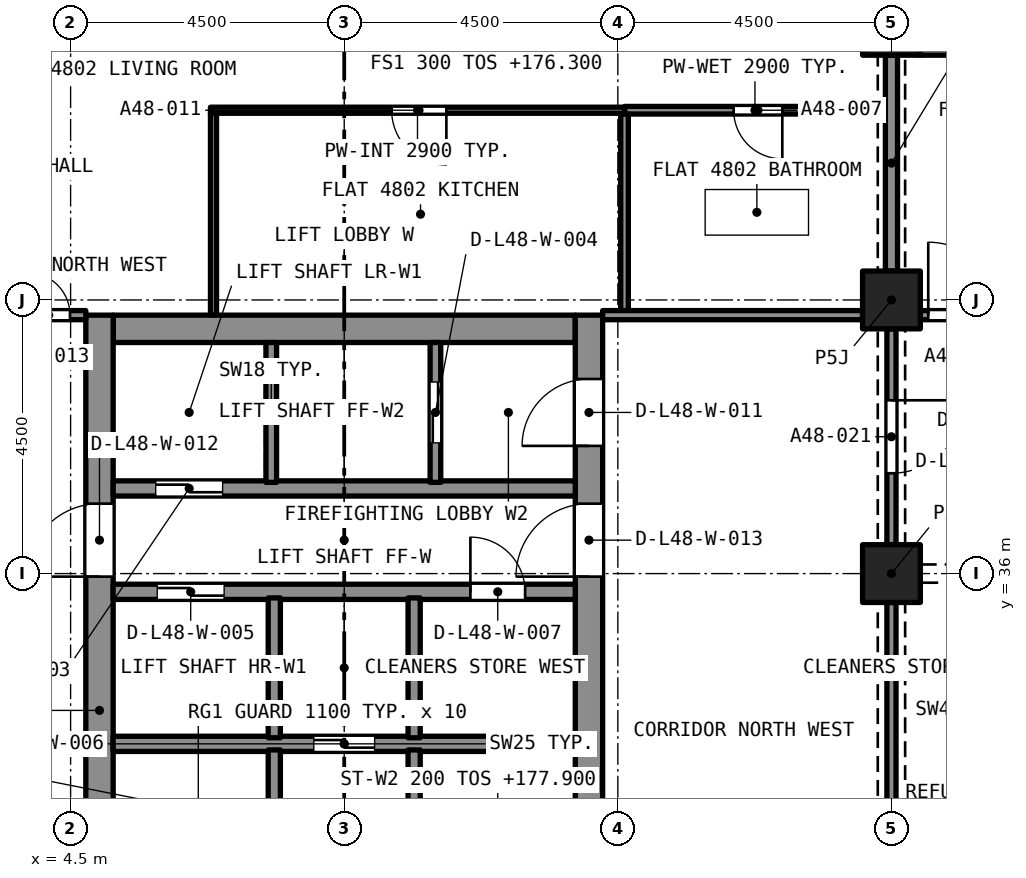
"""IFC4 building model, lengths in metres.
Left out: names, types, materials, properties, quantities, classifications, styles, units other than length and angle.
Written with IfcOpenShell. Run it as: python <this file> out.ifc"""

import sys

from ifc_helpers import new_model, si_unit, direction, frame, frame_2d, origin, origin_2d, place, context, subcontext, project, spatial, rectangle, extrude, element, fill, save


model = new_model("IFC4")
c1 = context("Model", 3, precision=1e-05, world=origin(), true_north=direction((0.0, 1.0)))
c2 = subcontext(c1, "Body", "Model", "MODEL_VIEW")
j1 = project(units=[si_unit("LENGTHUNIT", "METRE"), si_unit("PLANEANGLEUNIT", "RADIAN")], contexts=[c1])
p1 = place(None, origin())
s1 = spatial("IfcSite", under=j1, at=p1, CompositionType="ELEMENT")
p2 = place(p1, origin())
s2 = spatial("IfcBuilding", under=s1, at=p2, CompositionType="ELEMENT")
p3 = place(p2, frame((0.0, 0.0, 176.3)))
s3 = spatial("IfcBuildingStorey", under=s2, at=p3, CompositionType="ELEMENT", Elevation=176.3)
for number, where, z_axis, x_axis in (
    (1, (18.0, 36.0, 0.0), (0.0, 0.0, 1.0), (1.0, 0.0, 0.0)),
    (2, (18.0, 40.5, 0.0), (0.0, 0.0, 1.0), (1.0, 0.0, 0.0)),
    (3, (18.0, 45.0, 0.0), (0.0, 0.0, 1.0), (1.0, 0.0, 0.0)),
):
    element("IfcColumn", number, at=place(p3, frame(where, z_axis=z_axis, x_axis=x_axis)), inside=s3, PredefinedType="COLUMN", context=c2, shape_type="SweptSolid", body=[
        extrude(rectangle(XDim=0.95, YDim=0.95, at=origin_2d()), origin(), (0.0, 0.0, 1.0), 3.2),
    ])
p4 = place(p3, frame((5.2, 40.025, 0.0), z_axis=(0.0, 0.0, 1.0), x_axis=(1.0, 0.0, 0.0)))
e4 = element("IfcWall", 4, at=p4, inside=s3, PredefinedType="SOLIDWALL", context=c2, shape_type="SweptSolid", body=[
    extrude(rectangle(XDim=7.6, YDim=0.45, at=frame_2d((3.8, 0.0))), origin(), (0.0, 0.0, 1.0), 3.2),
])
p5 = place(p3, frame((4.975, 27.25, 0.0), z_axis=(0.0, 0.0, 1.0), x_axis=(0.0, 1.0, 0.0)))
e5 = element("IfcWall", 5, at=p5, inside=s3, PredefinedType="SOLIDWALL", context=c2, shape_type="SweptSolid", body=[
    extrude(rectangle(XDim=13.0, YDim=0.45, at=frame_2d((6.5, 0.0))), origin(), (0.0, 0.0, 1.0), 3.2),
])
p6 = place(p5, frame((8.7, 0.0, 0.0)))
e6 = element("IfcOpeningElement", 6, at=p6, cuts=e5, PredefinedType="OPENING", context=c2, shape_type="SweptSolid", body=[
    extrude(rectangle(XDim=1.2, YDim=2.1, at=frame_2d((0.6, 1.05))), frame((0.0, 0.235, 0.0), z_axis=(0.0, -1.0, 0.0), x_axis=(1.0, 0.0, 0.0)), (0.0, 0.0, 1.0), 0.47),
])
p7 = place(p3, frame((13.025, 27.25, 0.0), z_axis=(0.0, 0.0, 1.0), x_axis=(0.0, 1.0, 0.0)))
e7 = element("IfcWall", 7, at=p7, inside=s3, PredefinedType="SOLIDWALL", context=c2, shape_type="SweptSolid", body=[
    extrude(rectangle(XDim=13.0, YDim=0.45, at=frame_2d((6.5, 0.0))), origin(), (0.0, 0.0, 1.0), 3.2),
])
p8 = place(p7, frame((10.85, 0.0, 0.0)))
e8 = element("IfcOpeningElement", 8, at=p8, cuts=e7, PredefinedType="OPENING", context=c2, shape_type="SweptSolid", body=[
    extrude(rectangle(XDim=1.1, YDim=2.1, at=frame_2d((0.55, 1.05))), frame((0.0, 0.235, 0.0), z_axis=(0.0, -1.0, 0.0), x_axis=(1.0, 0.0, 0.0)), (0.0, 0.0, 1.0), 0.47),
])
p9 = place(p7, frame((8.7, 0.0, 0.0)))
e9 = element("IfcOpeningElement", 9, at=p9, cuts=e7, PredefinedType="OPENING", context=c2, shape_type="SweptSolid", body=[
    extrude(rectangle(XDim=1.2, YDim=2.1, at=frame_2d((0.6, 1.05))), frame((0.0, 0.235, 0.0), z_axis=(0.0, -1.0, 0.0), x_axis=(1.0, 0.0, 0.0)), (0.0, 0.0, 1.0), 0.47),
])
p10 = place(p3, frame((17.9, 43.62, 0.0), z_axis=(0.0, 0.0, 1.0), x_axis=(-1.0, 0.0, 0.0)))
e10 = element("IfcWall", 10, at=p10, inside=s3, PredefinedType="PARTITIONING", context=c2, shape_type="SweptSolid", body=[
    extrude(rectangle(XDim=4.29, YDim=0.125, at=frame_2d((2.145, 0.0))), origin(), (0.0, 0.0, 1.0), 2.9),
])
p11 = place(p10, frame((1.695, 0.0, 0.0)))
e11 = element("IfcOpeningElement", 11, at=p11, cuts=e10, PredefinedType="OPENING", context=c2, shape_type="SweptSolid", body=[
    extrude(rectangle(XDim=0.8, YDim=2.1, at=frame_2d((0.4, 1.05))), frame((0.0, 0.073, 0.0), z_axis=(0.0, -1.0, 0.0), x_axis=(1.0, 0.0, 0.0)), (0.0, 0.0, 1.0), 0.145),
])
p12 = place(p3, frame((13.61, 40.325, 0.0), z_axis=(0.0, 0.0, 1.0), x_axis=(0.0, 1.0, 0.0)))
e12 = element("IfcWall", 12, at=p12, inside=s3, PredefinedType="PARTITIONING", context=c2, shape_type="SweptSolid", body=[
    extrude(rectangle(XDim=3.233, YDim=0.125, at=frame_2d((1.616, 0.0))), origin(), (0.0, 0.0, 1.0), 2.9),
])
p13 = place(p3, frame((18.0, 40.975, 0.0), z_axis=(0.0, 0.0, 1.0), x_axis=(0.0, 1.0, 0.0)))
e13 = element("IfcWall", 13, at=p13, inside=s3, PredefinedType="PARTITIONING", context=c2, shape_type="SweptSolid", body=[
    extrude(rectangle(XDim=3.55, YDim=0.2, at=frame_2d((1.775, 0.0))), origin(), (0.0, 0.0, 1.0), 2.38),
])
p14 = place(p3, frame((13.61, 43.62, 0.0), z_axis=(0.0, 0.0, 1.0), x_axis=(-1.0, 0.0, 0.0)))
e14 = element("IfcWall", 14, at=p14, inside=s3, PredefinedType="PARTITIONING", context=c2, shape_type="SweptSolid", body=[
    extrude(rectangle(XDim=6.81, YDim=0.1, at=frame_2d((3.405, 0.0))), origin(), (0.0, 0.0, 1.0), 2.9),
])
p15 = place(p14, frame((2.93, 0.0, 0.0)))
e15 = element("IfcOpeningElement", 15, at=p15, cuts=e14, PredefinedType="OPENING", context=c2, shape_type="SweptSolid", body=[
    extrude(rectangle(XDim=0.9, YDim=2.1, at=frame_2d((0.45, 1.05))), frame((0.0, 0.06, 0.0), z_axis=(0.0, -1.0, 0.0), x_axis=(1.0, 0.0, 0.0)), (0.0, 0.0, 1.0), 0.12),
])
p16 = place(p3, frame((6.85, 40.25, 0.0), z_axis=(0.0, 0.0, 1.0), x_axis=(0.0, 1.0, 0.0)))
e16 = element("IfcWall", 16, at=p16, inside=s3, PredefinedType="PARTITIONING", context=c2, shape_type="SweptSolid", body=[
    extrude(rectangle(XDim=3.32, YDim=0.1, at=frame_2d((1.66, 0.0))), origin(), (0.0, 0.0, 1.0), 2.9),
])
p17 = place(p3, frame((3.55, 40.25, 0.0), z_axis=(0.0, 0.0, 1.0), x_axis=(1.0, 0.0, 0.0)))
e17 = element("IfcWall", 17, at=p17, inside=s3, PredefinedType="PARTITIONING", context=c2, shape_type="SweptSolid", body=[
    extrude(rectangle(XDim=1.2, YDim=0.15, at=frame_2d((0.6, 0.0))), origin(), (0.0, 0.0, 1.0), 2.9),
])
p18 = place(p17, frame((0.24, 0.0, 0.0)))
e18 = element("IfcOpeningElement", 18, at=p18, cuts=e17, PredefinedType="OPENING", context=c2, shape_type="SweptSolid", body=[
    extrude(rectangle(XDim=0.7, YDim=2.1, at=frame_2d((0.35, 1.05))), frame((0.0, 0.085, 0.0), z_axis=(0.0, -1.0, 0.0), x_axis=(1.0, 0.0, 0.0)), (0.0, 0.0, 1.0), 0.17),
])
p19 = place(p3, frame((13.25, 40.25, 0.0), z_axis=(0.0, 0.0, 1.0), x_axis=(1.0, 0.0, 0.0)))
e19 = element("IfcWall", 19, at=p19, inside=s3, PredefinedType="PARTITIONING", context=c2, shape_type="SweptSolid", body=[
    extrude(rectangle(XDim=4.275, YDim=0.15, at=frame_2d((2.137, 0.0))), origin(), (0.0, 0.0, 1.0), 2.9),
])
p20 = place(p3, frame((18.475, 44.575, 0.0), z_axis=(0.0, 0.0, 1.0), x_axis=(1.0, 0.0, 0.0)))
e20 = element("IfcWall", 20, at=p20, inside=s3, PredefinedType="PARTITIONING", context=c2, shape_type="SweptSolid", body=[
    extrude(rectangle(XDim=4.025, YDim=0.1, at=frame_2d((2.012, 0.0))), origin(), (0.0, 0.0, 1.0), 2.75),
])
p21 = place(p20, frame((1.325, 0.0, 0.0)))
e21 = element("IfcOpeningElement", 21, at=p21, cuts=e20, PredefinedType="OPENING", context=c2, shape_type="SweptSolid", body=[
    extrude(rectangle(XDim=0.9, YDim=2.1, at=frame_2d((0.45, 1.05))), frame((0.0, 0.06, 0.0), z_axis=(0.0, -1.0, 0.0), x_axis=(1.0, 0.0, 0.0)), (0.0, 0.0, 1.0), 0.12),
])
p22 = place(p3, frame((18.475, 40.25, 0.0), z_axis=(0.0, 0.0, 1.0), x_axis=(1.0, 0.0, 0.0)))
e22 = element("IfcWall", 22, at=p22, inside=s3, PredefinedType="PARTITIONING", context=c2, shape_type="SweptSolid", body=[
    extrude(rectangle(XDim=1.925, YDim=0.15, at=frame_2d((0.962, 0.0))), origin(), (0.0, 0.0, 1.0), 2.75),
])
p23 = place(p22, frame((0.13, 0.0, 0.0)))
e23 = element("IfcOpeningElement", 23, at=p23, cuts=e22, PredefinedType="OPENING", context=c2, shape_type="SweptSolid", body=[
    extrude(rectangle(XDim=1.2, YDim=2.4, at=frame_2d((0.6, 1.2))), frame((0.0, 0.085, 0.0), z_axis=(0.0, -1.0, 0.0), x_axis=(1.0, 0.0, 0.0)), (0.0, 0.0, 1.0), 0.17),
])
p24 = place(p3, frame((18.0, 31.975, 0.0), z_axis=(0.0, 0.0, 1.0), x_axis=(0.0, 1.0, 0.0)))
e24 = element("IfcWall", 24, at=p24, inside=s3, PredefinedType="PARTITIONING", context=c2, shape_type="SweptSolid", body=[
    extrude(rectangle(XDim=3.55, YDim=0.15, at=frame_2d((1.775, 0.0))), origin(), (0.0, 0.0, 1.0), 2.38),
])
p25 = place(p3, frame((18.0, 40.025, 0.0), z_axis=(0.0, 0.0, 1.0), x_axis=(0.0, -1.0, 0.0)))
e25 = element("IfcWall", 25, at=p25, inside=s3, PredefinedType="PARTITIONING", context=c2, shape_type="SweptSolid", body=[
    extrude(rectangle(XDim=3.55, YDim=0.15, at=frame_2d((1.775, 0.0))), origin(), (0.0, 0.0, 1.0), 2.38),
])
p26 = place(p25, frame((1.175, 0.0, 0.0)))
e26 = element("IfcOpeningElement", 26, at=p26, cuts=e25, PredefinedType="OPENING", context=c2, shape_type="SweptSolid", body=[
    extrude(rectangle(XDim=1.2, YDim=2.1, at=frame_2d((0.6, 1.05))), frame((0.0, 0.085, 0.0), z_axis=(0.0, -1.0, 0.0), x_axis=(1.0, 0.0, 0.0)), (0.0, 0.0, 1.0), 0.17),
])
p27 = place(p3, frame((5.2, 33.2, 0.0), z_axis=(0.0, 0.0, 1.0), x_axis=(1.0, 0.0, 0.0)))
e27 = element("IfcWall", 27, at=p27, inside=s3, PredefinedType="SOLIDWALL", context=c2, shape_type="SweptSolid", body=[
    extrude(rectangle(XDim=7.6, YDim=0.25, at=frame_2d((3.8, 0.0))), origin(), (0.0, 0.0, 1.0), 2.9),
])
p28 = place(p27, frame((3.3, 0.0, 0.0)))
e28 = element("IfcOpeningElement", 28, at=p28, cuts=e27, PredefinedType="OPENING", context=c2, shape_type="SweptSolid", body=[
    extrude(rectangle(XDim=1.0, YDim=2.1, at=frame_2d((0.5, 1.05))), frame((0.0, 0.135, 0.0), z_axis=(0.0, -1.0, 0.0), x_axis=(1.0, 0.0, 0.0)), (0.0, 0.0, 1.0), 0.27),
])
p29 = place(p3, frame((5.2, 35.7, 0.0), z_axis=(0.0, 0.0, 1.0), x_axis=(1.0, 0.0, 0.0)))
e29 = element("IfcWall", 29, at=p29, inside=s3, PredefinedType="SOLIDWALL", context=c2, shape_type="SweptSolid", body=[
    extrude(rectangle(XDim=7.6, YDim=0.25, at=frame_2d((3.8, 0.0))), origin(), (0.0, 0.0, 1.0), 2.9),
])
p30 = place(p29, frame((0.725, 0.0, 0.0)))
e30 = element("IfcOpeningElement", 30, at=p30, cuts=e29, PredefinedType="OPENING", context=c2, shape_type="SweptSolid", body=[
    extrude(rectangle(XDim=1.1, YDim=2.4, at=frame_2d((0.55, 1.2))), frame((0.0, 0.135, 0.0), z_axis=(0.0, -1.0, 0.0), x_axis=(1.0, 0.0, 0.0)), (0.0, 0.0, 1.0), 0.27),
])
p31 = place(p29, frame((5.875, 0.0, 0.0)))
e31 = element("IfcOpeningElement", 31, at=p31, cuts=e29, PredefinedType="OPENING", context=c2, shape_type="SweptSolid", body=[
    extrude(rectangle(XDim=0.9, YDim=2.1, at=frame_2d((0.45, 1.05))), frame((0.0, 0.135, 0.0), z_axis=(0.0, -1.0, 0.0), x_axis=(1.0, 0.0, 0.0)), (0.0, 0.0, 1.0), 0.27),
])
p32 = place(p3, frame((5.2, 37.4, 0.0), z_axis=(0.0, 0.0, 1.0), x_axis=(1.0, 0.0, 0.0)))
e32 = element("IfcWall", 32, at=p32, inside=s3, PredefinedType="SOLIDWALL", context=c2, shape_type="SweptSolid", body=[
    extrude(rectangle(XDim=7.6, YDim=0.25, at=frame_2d((3.8, 0.0))), origin(), (0.0, 0.0, 1.0), 2.9),
])
p33 = place(p32, frame((0.7, 0.0, 0.0)))
e33 = element("IfcOpeningElement", 33, at=p33, cuts=e32, PredefinedType="OPENING", context=c2, shape_type="SweptSolid", body=[
    extrude(rectangle(XDim=1.1, YDim=2.4, at=frame_2d((0.55, 1.2))), frame((0.0, 0.135, 0.0), z_axis=(0.0, -1.0, 0.0), x_axis=(1.0, 0.0, 0.0)), (0.0, 0.0, 1.0), 0.27),
])
p34 = place(p3, frame((7.85, 27.7, 0.0), z_axis=(0.0, 0.0, 1.0), x_axis=(0.0, 1.0, 0.0)))
e34 = element("IfcWall", 34, at=p34, inside=s3, PredefinedType="SOLIDWALL", context=c2, shape_type="SweptSolid", body=[
    extrude(rectangle(XDim=5.4, YDim=0.2, at=frame_2d((2.7, 0.0))), origin(), (0.0, 0.0, 1.0), 2.9),
])
p35 = place(p34, frame((0.2, 0.0, 0.0)))
e35 = element("IfcOpeningElement", 35, at=p35, cuts=e34, PredefinedType="OPENING", context=c2, shape_type="SweptSolid", body=[
    extrude(rectangle(XDim=0.9, YDim=2.1, at=frame_2d((0.45, 1.05))), frame((0.0, 0.11, 0.0), z_axis=(0.0, -1.0, 0.0), x_axis=(1.0, 0.0, 0.0)), (0.0, 0.0, 1.0), 0.22),
])
p36 = place(p3, frame((10.15, 27.7, 0.0), z_axis=(0.0, 0.0, 1.0), x_axis=(0.0, 1.0, 0.0)))
e36 = element("IfcWall", 36, at=p36, inside=s3, PredefinedType="SOLIDWALL", context=c2, shape_type="SweptSolid", body=[
    extrude(rectangle(XDim=5.4, YDim=0.2, at=frame_2d((2.7, 0.0))), origin(), (0.0, 0.0, 1.0), 2.9),
])
p37 = place(p36, frame((0.2, 0.0, 0.0)))
e37 = element("IfcOpeningElement", 37, at=p37, cuts=e36, PredefinedType="OPENING", context=c2, shape_type="SweptSolid", body=[
    extrude(rectangle(XDim=0.9, YDim=2.1, at=frame_2d((0.45, 1.05))), frame((0.0, 0.11, 0.0), z_axis=(0.0, -1.0, 0.0), x_axis=(1.0, 0.0, 0.0)), (0.0, 0.0, 1.0), 0.22),
])
for number, where, z_axis, x_axis in (
    (38, (7.85, 33.3, 0.0), (0.0, 0.0, 1.0), (0.0, 1.0, 0.0)),
    (39, (10.15, 33.3, 0.0), (0.0, 0.0, 1.0), (0.0, 1.0, 0.0)),
):
    element("IfcWall", number, at=place(p3, frame(where, z_axis=z_axis, x_axis=x_axis)), inside=s3, PredefinedType="SOLIDWALL", context=c2, shape_type="SweptSolid", body=[
        extrude(rectangle(XDim=2.3, YDim=0.2, at=frame_2d((1.15, 0.0))), origin(), (0.0, 0.0, 1.0), 2.9),
    ])
p38 = place(p3, frame((7.8, 37.5, 0.0), z_axis=(0.0, 0.0, 1.0), x_axis=(0.0, 1.0, 0.0)))
e40 = element("IfcWall", 40, at=p38, inside=s3, PredefinedType="SOLIDWALL", context=c2, shape_type="SweptSolid", body=[
    extrude(rectangle(XDim=2.3, YDim=0.175, at=frame_2d((1.15, 0.0))), origin(), (0.0, 0.0, 1.0), 2.9),
])
p39 = place(p3, frame((10.5, 37.5, 0.0), z_axis=(0.0, 0.0, 1.0), x_axis=(0.0, 1.0, 0.0)))
e41 = element("IfcWall", 41, at=p39, inside=s3, PredefinedType="SOLIDWALL", context=c2, shape_type="SweptSolid", body=[
    extrude(rectangle(XDim=2.3, YDim=0.175, at=frame_2d((1.15, 0.0))), origin(), (0.0, 0.0, 1.0), 2.9),
])
p40 = place(p39, frame((0.65, 0.0, 0.0)))
e42 = element("IfcOpeningElement", 42, at=p40, cuts=e41, PredefinedType="OPENING", context=c2, shape_type="SweptSolid", body=[
    extrude(rectangle(XDim=1.0, YDim=2.1, at=frame_2d((0.5, 1.05))), frame((0.0, 0.097, 0.0), z_axis=(0.0, -1.0, 0.0), x_axis=(1.0, 0.0, 0.0)), (0.0, 0.0, 1.0), 0.195),
])
p41 = place(p11, origin())
e43 = element("IfcDoor", 43, at=p41, inside=s3, OperationType="SINGLE_SWING_LEFT", PredefinedType="DOOR", context=c2, shape_type="SweptSolid", body=[
    extrude(rectangle(XDim=0.8, YDim=2.1, at=frame_2d((0.4, 1.05))), frame((0.0, 0.025, 0.0), z_axis=(0.0, -1.0, 0.0), x_axis=(1.0, 0.0, 0.0)), (0.0, 0.0, 1.0), 0.05),
])
fill(e11, e43)
p42 = place(p15, origin())
e44 = element("IfcDoor", 44, at=p42, inside=s3, OperationType="SINGLE_SWING_LEFT", PredefinedType="DOOR", context=c2, shape_type="SweptSolid", body=[
    extrude(rectangle(XDim=0.9, YDim=2.1, at=frame_2d((0.45, 1.05))), frame((0.0, 0.025, 0.0), z_axis=(0.0, -1.0, 0.0), x_axis=(1.0, 0.0, 0.0)), (0.0, 0.0, 1.0), 0.05),
])
fill(e15, e44)
p43 = place(p18, origin())
e45 = element("IfcDoor", 45, at=p43, inside=s3, OperationType="SINGLE_SWING_LEFT", PredefinedType="DOOR", context=c2, shape_type="SweptSolid", body=[
    extrude(rectangle(XDim=0.7, YDim=2.1, at=frame_2d((0.35, 1.05))), frame((0.0, 0.025, 0.0), z_axis=(0.0, -1.0, 0.0), x_axis=(1.0, 0.0, 0.0)), (0.0, 0.0, 1.0), 0.05),
])
fill(e18, e45)
p44 = place(p23, origin())
e46 = element("IfcDoor", 46, at=p44, inside=s3, OperationType="SINGLE_SWING_LEFT", PredefinedType="DOOR", context=c2, shape_type="SweptSolid", body=[
    extrude(rectangle(XDim=1.2, YDim=2.4, at=frame_2d((0.6, 1.2))), frame((0.0, 0.025, 0.0), z_axis=(0.0, -1.0, 0.0), x_axis=(1.0, 0.0, 0.0)), (0.0, 0.0, 1.0), 0.05),
])
fill(e23, e46)
p45 = place(p26, origin())
e47 = element("IfcDoor", 47, at=p45, inside=s3, OperationType="SINGLE_SWING_LEFT", PredefinedType="DOOR", context=c2, shape_type="SweptSolid", body=[
    extrude(rectangle(XDim=1.2, YDim=2.1, at=frame_2d((0.6, 1.05))), frame((0.0, 0.025, 0.0), z_axis=(0.0, -1.0, 0.0), x_axis=(1.0, 0.0, 0.0)), (0.0, 0.0, 1.0), 0.05),
])
fill(e26, e47)
p46 = place(p33, origin())
e48 = element("IfcDoor", 48, at=p46, inside=s3, OperationType="SLIDING_TO_LEFT", PredefinedType="DOOR", context=c2, shape_type="SweptSolid", body=[
    extrude(rectangle(XDim=1.1, YDim=2.4, at=frame_2d((0.55, 1.2))), frame((0.0, 0.025, 0.0), z_axis=(0.0, -1.0, 0.0), x_axis=(1.0, 0.0, 0.0)), (0.0, 0.0, 1.0), 0.05),
])
fill(e33, e48)
p47 = place(p40, origin())
e49 = element("IfcDoor", 49, at=p47, inside=s3, OperationType="SLIDING_TO_LEFT", PredefinedType="DOOR", context=c2, shape_type="SweptSolid", body=[
    extrude(rectangle(XDim=1.0, YDim=2.1, at=frame_2d((0.5, 1.05))), frame((0.0, 0.025, 0.0), z_axis=(0.0, -1.0, 0.0), x_axis=(1.0, 0.0, 0.0)), (0.0, 0.0, 1.0), 0.05),
])
fill(e42, e49)
p48 = place(p30, origin())
e50 = element("IfcDoor", 50, at=p48, inside=s3, OperationType="SLIDING_TO_LEFT", PredefinedType="DOOR", context=c2, shape_type="SweptSolid", body=[
    extrude(rectangle(XDim=1.1, YDim=2.4, at=frame_2d((0.55, 1.2))), frame((0.0, 0.025, 0.0), z_axis=(0.0, -1.0, 0.0), x_axis=(1.0, 0.0, 0.0)), (0.0, 0.0, 1.0), 0.05),
])
fill(e30, e50)
p49 = place(p28, origin())
e51 = element("IfcDoor", 51, at=p49, inside=s3, OperationType="SLIDING_TO_LEFT", PredefinedType="DOOR", context=c2, shape_type="SweptSolid", body=[
    extrude(rectangle(XDim=1.0, YDim=2.1, at=frame_2d((0.5, 1.05))), frame((0.0, 0.025, 0.0), z_axis=(0.0, -1.0, 0.0), x_axis=(1.0, 0.0, 0.0)), (0.0, 0.0, 1.0), 0.05),
])
fill(e28, e51)
p50 = place(p31, origin())
e52 = element("IfcDoor", 52, at=p50, inside=s3, OperationType="SINGLE_SWING_LEFT", PredefinedType="DOOR", context=c2, shape_type="SweptSolid", body=[
    extrude(rectangle(XDim=0.9, YDim=2.1, at=frame_2d((0.45, 1.05))), frame((0.0, 0.025, 0.0), z_axis=(0.0, -1.0, 0.0), x_axis=(1.0, 0.0, 0.0)), (0.0, 0.0, 1.0), 0.05),
])
fill(e31, e52)
p51 = place(p8, origin())
e53 = element("IfcDoor", 53, at=p51, inside=s3, OperationType="SINGLE_SWING_LEFT", PredefinedType="DOOR", context=c2, shape_type="SweptSolid", body=[
    extrude(rectangle(XDim=1.1, YDim=2.1, at=frame_2d((0.55, 1.05))), frame((0.0, 0.025, 0.0), z_axis=(0.0, -1.0, 0.0), x_axis=(1.0, 0.0, 0.0)), (0.0, 0.0, 1.0), 0.05),
])
fill(e8, e53)
p52 = place(p6, origin())
e54 = element("IfcDoor", 54, at=p52, inside=s3, OperationType="SINGLE_SWING_LEFT", PredefinedType="DOOR", context=c2, shape_type="SweptSolid", body=[
    extrude(rectangle(XDim=1.2, YDim=2.1, at=frame_2d((0.6, 1.05))), frame((0.0, 0.025, 0.0), z_axis=(0.0, -1.0, 0.0), x_axis=(1.0, 0.0, 0.0)), (0.0, 0.0, 1.0), 0.05),
])
fill(e6, e54)
p53 = place(p9, origin())
e55 = element("IfcDoor", 55, at=p53, inside=s3, OperationType="SINGLE_SWING_LEFT", PredefinedType="DOOR", context=c2, shape_type="SweptSolid", body=[
    extrude(rectangle(XDim=1.2, YDim=2.1, at=frame_2d((0.6, 1.05))), frame((0.0, 0.025, 0.0), z_axis=(0.0, -1.0, 0.0), x_axis=(1.0, 0.0, 0.0)), (0.0, 0.0, 1.0), 0.05),
])
fill(e9, e55)
save(model, sys.argv[1])
